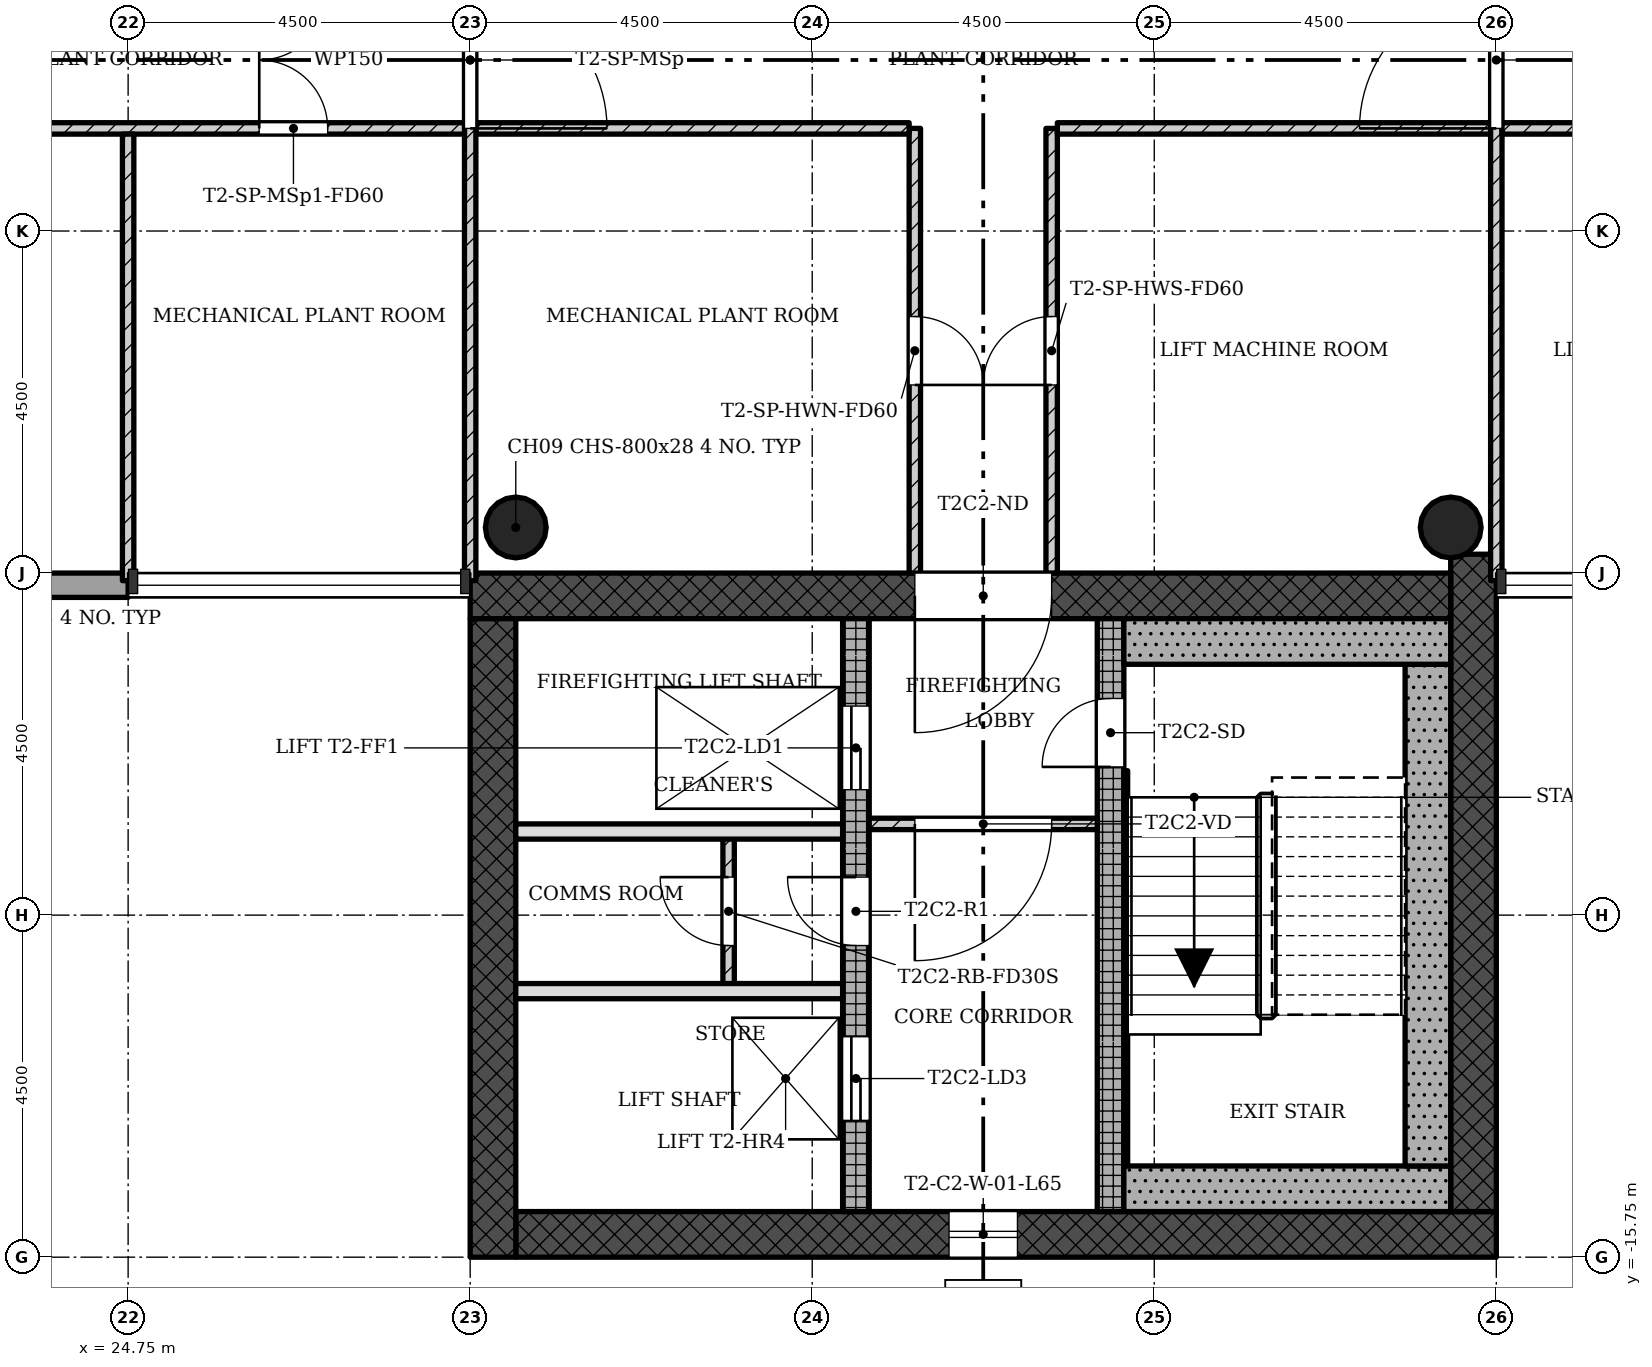
"""IFC4 building model, lengths in metres.
Left out: names, types, materials, properties, quantities, classifications, styles, units other than length and angle.
Written with IfcOpenShell. Run it as: python <this file> out.ifc"""

import sys

from ifc_helpers import new_model, si_unit, direction, frame, frame_2d, origin, origin_2d, place, context, subcontext, project, spatial, rectangle, hollow_circle, extrude, element, fill, save


model = new_model("IFC4")
c1 = context("Model", 3, precision=1e-05, world=origin(), true_north=direction((0.0, 1.0)))
c2 = subcontext(c1, "Body", "Model", "MODEL_VIEW")
j1 = project(units=[si_unit("LENGTHUNIT", "METRE"), si_unit("PLANEANGLEUNIT", "RADIAN")], contexts=[c1])
p1 = place(None, origin())
s1 = spatial("IfcSite", under=j1, at=p1, CompositionType="ELEMENT")
p2 = place(p1, origin())
s2 = spatial("IfcBuilding", under=s1, at=p2, CompositionType="ELEMENT")
p3 = place(p2, frame((0.0, 0.0, 233.4)))
s3 = spatial("IfcBuildingStorey", under=s2, at=p3, CompositionType="ELEMENT", Elevation=233.4)
p4 = place(p3, frame((29.85, -15.45, 0.0), z_axis=(0.0, 0.0, 1.0), x_axis=(1.0, 0.0, 0.0)))
e1 = element("IfcWall", 1, at=p4, inside=s3, PredefinedType="SHEAR", context=c2, shape_type="SweptSolid", body=[
    extrude(rectangle(XDim=12.9, YDim=0.6, at=frame_2d((6.45, 0.0))), origin(), (0.0, 0.0, 1.0), 4.5),
])
p5 = place(p4, frame((5.7, 0.0, 0.45)))
e2 = element("IfcOpeningElement", 2, at=p5, cuts=e1, PredefinedType="OPENING", context=c2, shape_type="SweptSolid", body=[
    extrude(rectangle(XDim=0.9, YDim=2.4, at=frame_2d((0.45, 1.2))), frame((0.0, 0.31, 0.0), z_axis=(0.0, -1.0, 0.0), x_axis=(1.0, 0.0, 0.0)), (0.0, 0.0, 1.0), 0.62),
])
p6 = place(p3, frame((42.45, -15.15, 0.0), z_axis=(0.0, 0.0, 1.0), x_axis=(0.0, 1.0, 0.0)))
e3 = element("IfcWall", 3, at=p6, inside=s3, PredefinedType="SHEAR", context=c2, shape_type="SweptSolid", body=[
    extrude(rectangle(XDim=8.648, YDim=0.6, at=frame_2d((4.324, 0.0))), origin(), (0.0, 0.0, 1.0), 4.5),
])
p7 = place(p3, frame((42.15, -7.05, 0.0), z_axis=(0.0, 0.0, 1.0), x_axis=(-1.0, 0.0, 0.0)))
e4 = element("IfcWall", 4, at=p7, inside=s3, PredefinedType="SHEAR", context=c2, shape_type="SweptSolid", body=[
    extrude(rectangle(XDim=12.9, YDim=0.6, at=frame_2d((6.45, 0.0))), origin(), (0.0, 0.0, 1.0), 4.5),
])
p8 = place(p7, frame((5.25, 0.0, 0.0)))
e5 = element("IfcOpeningElement", 5, at=p8, cuts=e4, PredefinedType="OPENING", context=c2, shape_type="SweptSolid", body=[
    extrude(rectangle(XDim=1.8, YDim=2.1, at=frame_2d((0.9, 1.05))), frame((0.0, 0.31, 0.0), z_axis=(0.0, -1.0, 0.0), x_axis=(1.0, 0.0, 0.0)), (0.0, 0.0, 1.0), 0.62),
])
p9 = place(p3, frame((29.55, -7.35, 0.0), z_axis=(0.0, 0.0, 1.0), x_axis=(0.0, -1.0, 0.0)))
e6 = element("IfcWall", 6, at=p9, inside=s3, PredefinedType="SHEAR", context=c2, shape_type="SweptSolid", body=[
    extrude(rectangle(XDim=8.4, YDim=0.6, at=frame_2d((4.2, 0.0))), origin(), (0.0, 0.0, 1.0), 4.5),
])
p10 = place(p3, frame((34.325, -15.15, 0.0), z_axis=(0.0, 0.0, 1.0), x_axis=(0.0, 1.0, 0.0)))
e7 = element("IfcWall", 7, at=p10, inside=s3, PredefinedType="SHEAR", context=c2, shape_type="SweptSolid", body=[
    extrude(rectangle(XDim=7.8, YDim=0.35, at=frame_2d((3.9, 0.0))), origin(), (0.0, 0.0, 1.0), 4.5),
])
p11 = place(p10, frame((5.55, 0.0, 0.0)))
e8 = element("IfcOpeningElement", 8, at=p11, cuts=e7, PredefinedType="OPENING", context=c2, shape_type="SweptSolid", body=[
    extrude(rectangle(XDim=1.1, YDim=2.1, at=frame_2d((0.55, 1.05))), frame((0.0, 0.185, 0.0), z_axis=(0.0, -1.0, 0.0), x_axis=(1.0, 0.0, 0.0)), (0.0, 0.0, 1.0), 0.37),
])
p12 = place(p10, frame((1.2, 0.0, 0.0)))
e9 = element("IfcOpeningElement", 9, at=p12, cuts=e7, PredefinedType="OPENING", context=c2, shape_type="SweptSolid", body=[
    extrude(rectangle(XDim=1.1, YDim=2.1, at=frame_2d((0.55, 1.05))), frame((0.0, 0.185, 0.0), z_axis=(0.0, -1.0, 0.0), x_axis=(1.0, 0.0, 0.0)), (0.0, 0.0, 1.0), 0.37),
])
p13 = place(p10, frame((3.5, 0.0, 0.0)))
e10 = element("IfcOpeningElement", 10, at=p13, cuts=e7, PredefinedType="OPENING", context=c2, shape_type="SweptSolid", body=[
    extrude(rectangle(XDim=0.9, YDim=2.1, at=frame_2d((0.45, 1.05))), frame((0.0, 0.185, 0.0), z_axis=(0.0, -1.0, 0.0), x_axis=(1.0, 0.0, 0.0)), (0.0, 0.0, 1.0), 0.37),
])
p14 = place(p3, frame((37.675, -15.15, 0.0), z_axis=(0.0, 0.0, 1.0), x_axis=(0.0, 1.0, 0.0)))
e11 = element("IfcWall", 11, at=p14, inside=s3, PredefinedType="SHEAR", context=c2, shape_type="SweptSolid", body=[
    extrude(rectangle(XDim=7.8, YDim=0.35, at=frame_2d((3.9, 0.0))), origin(), (0.0, 0.0, 1.0), 4.5),
])
p15 = place(p14, frame((5.85, 0.0, 0.0)))
e12 = element("IfcOpeningElement", 12, at=p15, cuts=e11, PredefinedType="OPENING", context=c2, shape_type="SweptSolid", body=[
    extrude(rectangle(XDim=0.9, YDim=2.1, at=frame_2d((0.45, 1.05))), frame((0.0, 0.185, 0.0), z_axis=(0.0, -1.0, 0.0), x_axis=(1.0, 0.0, 0.0)), (0.0, 0.0, 1.0), 0.37),
])
for number, where, z_axis, x_axis in (
    (13, (42.15, -6.15, 0.0), (0.0, 0.0, 1.0), (1.0, 0.0, 0.0)),
    (14, (29.85, -6.15, 0.0), (0.0, 0.0, 1.0), (1.0, 0.0, 0.0)),
):
    element("IfcColumn", number, at=place(p3, frame(where, z_axis=z_axis, x_axis=x_axis)), inside=s3, PredefinedType="COLUMN", context=c2, shape_type="SweptSolid", body=[
        extrude(hollow_circle(Radius=0.4, WallThickness=0.028, at=origin_2d()), origin(), (0.0, 0.0, 1.0), 4.5),
    ])
p16 = place(p3, frame((23.25, -6.91, 0.0), z_axis=(0.0, 0.0, 1.0), x_axis=(1.0, 0.0, 0.0)))
e15 = element("IfcWall", 15, at=p16, inside=s3, PredefinedType="STANDARD", context=c2, shape_type="SweptSolid", body=[
    extrude(rectangle(XDim=1.5, YDim=0.32, at=frame_2d((0.75, 0.0))), origin(), (0.0, 0.0, 1.0), 4.2),
])
p17 = place(p3, frame((34.5, -10.05, 0.0), z_axis=(0.0, 0.0, 1.0), x_axis=(1.0, 0.0, 0.0)))
e16 = element("IfcWall", 16, at=p17, inside=s3, PredefinedType="PARTITIONING", context=c2, shape_type="SweptSolid", body=[
    extrude(rectangle(XDim=3.0, YDim=0.15, at=frame_2d((1.5, 0.0))), origin(), (0.0, 0.0, 1.0), 4.1),
])
p18 = place(p17, frame((0.6, 0.0, 0.0)))
e17 = element("IfcOpeningElement", 17, at=p18, cuts=e16, PredefinedType="OPENING", context=c2, shape_type="SweptSolid", body=[
    extrude(rectangle(XDim=1.8, YDim=2.1, at=frame_2d((0.9, 1.05))), frame((0.0, 0.085, 0.0), z_axis=(0.0, -1.0, 0.0), x_axis=(1.0, 0.0, 0.0)), (0.0, 0.0, 1.0), 0.17),
])
for number, where, z_axis, x_axis in (
    (18, (29.85, -12.25, 0.0), (0.0, 0.0, 1.0), (1.0, 0.0, 0.0)),
    (19, (29.85, -10.15, 0.0), (0.0, 0.0, 1.0), (1.0, 0.0, 0.0)),
):
    element("IfcWall", number, at=place(p3, frame(where, z_axis=z_axis, x_axis=x_axis)), inside=s3, PredefinedType="SOLIDWALL", context=c2, shape_type="SweptSolid", body=[
        extrude(rectangle(XDim=4.3, YDim=0.2, at=frame_2d((2.15, 0.0))), origin(), (0.0, 0.0, 1.0), 4.1),
    ])
p19 = place(p3, frame((32.65, -10.15, 0.0), z_axis=(0.0, 0.0, 1.0), x_axis=(0.0, -1.0, 0.0)))
e20 = element("IfcWall", 20, at=p19, inside=s3, PredefinedType="PARTITIONING", context=c2, shape_type="SweptSolid", body=[
    extrude(rectangle(XDim=2.1, YDim=0.15, at=frame_2d((1.05, 0.0))), origin(), (0.0, 0.0, 1.0), 4.1),
])
p20 = place(p19, frame((0.6, 0.0, 0.0)))
e21 = element("IfcOpeningElement", 21, at=p20, cuts=e20, PredefinedType="OPENING", context=c2, shape_type="SweptSolid", body=[
    extrude(rectangle(XDim=0.9, YDim=2.1, at=frame_2d((0.45, 1.05))), frame((0.0, 0.085, 0.0), z_axis=(0.0, -1.0, 0.0), x_axis=(1.0, 0.0, 0.0)), (0.0, 0.0, 1.0), 0.17),
])
p21 = place(p3, frame((35.1, -6.75, 0.0), z_axis=(0.0, 0.0, 1.0), x_axis=(0.0, 1.0, 0.0)))
e22 = element("IfcWall", 22, at=p21, inside=s3, PredefinedType="PARTITIONING", context=c2, shape_type="SweptSolid", body=[
    extrude(rectangle(XDim=5.85, YDim=0.15, at=frame_2d((2.925, 0.0))), origin(), (0.0, 0.0, 1.0), 4.1),
])
p22 = place(p21, frame((2.475, 0.0, 0.0)))
e23 = element("IfcOpeningElement", 23, at=p22, cuts=e22, PredefinedType="OPENING", context=c2, shape_type="SweptSolid", body=[
    extrude(rectangle(XDim=0.9, YDim=2.1, at=frame_2d((0.45, 1.05))), frame((0.0, 0.085, 0.0), z_axis=(0.0, -1.0, 0.0), x_axis=(1.0, 0.0, 0.0)), (0.0, 0.0, 1.0), 0.17),
])
p23 = place(p3, frame((35.025, -0.9, 0.0), z_axis=(0.0, 0.0, 1.0), x_axis=(-1.0, 0.0, 0.0)))
e24 = element("IfcWall", 24, at=p23, inside=s3, PredefinedType="PARTITIONING", context=c2, shape_type="SweptSolid", body=[
    extrude(rectangle(XDim=5.7, YDim=0.15, at=frame_2d((2.85, 0.0))), origin(), (0.0, 0.0, 1.0), 4.1),
])
p24 = place(p3, frame((36.9, -6.75, 0.0), z_axis=(0.0, 0.0, 1.0), x_axis=(0.0, 1.0, 0.0)))
e25 = element("IfcWall", 25, at=p24, inside=s3, PredefinedType="PARTITIONING", context=c2, shape_type="SweptSolid", body=[
    extrude(rectangle(XDim=5.85, YDim=0.15, at=frame_2d((2.925, 0.0))), origin(), (0.0, 0.0, 1.0), 4.1),
])
p25 = place(p24, frame((2.475, 0.0, 0.0)))
e26 = element("IfcOpeningElement", 26, at=p25, cuts=e25, PredefinedType="OPENING", context=c2, shape_type="SweptSolid", body=[
    extrude(rectangle(XDim=0.9, YDim=2.1, at=frame_2d((0.45, 1.05))), frame((0.0, 0.085, 0.0), z_axis=(0.0, -1.0, 0.0), x_axis=(1.0, 0.0, 0.0)), (0.0, 0.0, 1.0), 0.17),
])
p26 = place(p3, frame((42.675, -0.9, 0.0), z_axis=(0.0, 0.0, 1.0), x_axis=(-1.0, 0.0, 0.0)))
e27 = element("IfcWall", 27, at=p26, inside=s3, PredefinedType="PARTITIONING", context=c2, shape_type="SweptSolid", body=[
    extrude(rectangle(XDim=5.7, YDim=0.15, at=frame_2d((2.85, 0.0))), origin(), (0.0, 0.0, 1.0), 4.1),
])
p27 = place(p3, frame((29.25, -6.85, 0.0), z_axis=(0.0, 0.0, 1.0), x_axis=(0.0, 1.0, 0.0)))
e28 = element("IfcWall", 28, at=p27, inside=s3, PredefinedType="PARTITIONING", context=c2, shape_type="SweptSolid", body=[
    extrude(rectangle(XDim=13.7, YDim=0.15, at=frame_2d((6.85, 0.0))), origin(), (0.0, 0.0, 1.0), 4.1),
])
p28 = place(p27, frame((5.95, 0.0, 0.0)))
e29 = element("IfcOpeningElement", 29, at=p28, cuts=e28, PredefinedType="OPENING", context=c2, shape_type="SweptSolid", body=[
    extrude(rectangle(XDim=1.8, YDim=2.1, at=frame_2d((0.9, 1.05))), frame((0.0, 0.085, 0.0), z_axis=(0.0, -1.0, 0.0), x_axis=(1.0, 0.0, 0.0)), (0.0, 0.0, 1.0), 0.17),
])
p29 = place(p3, frame((29.175, -0.9, 0.0), z_axis=(0.0, 0.0, 1.0), x_axis=(-1.0, 0.0, 0.0)))
e30 = element("IfcWall", 30, at=p29, inside=s3, PredefinedType="PARTITIONING", context=c2, shape_type="SweptSolid", body=[
    extrude(rectangle(XDim=9.025, YDim=0.15, at=frame_2d((4.513, 0.0))), origin(), (0.0, 0.0, 1.0), 4.1),
])
p30 = place(p29, frame((1.8, 0.0, 0.0)))
e31 = element("IfcOpeningElement", 31, at=p30, cuts=e30, PredefinedType="OPENING", context=c2, shape_type="SweptSolid", body=[
    extrude(rectangle(XDim=0.9, YDim=2.1, at=frame_2d((0.45, 1.05))), frame((0.0, 0.085, 0.0), z_axis=(0.0, -1.0, 0.0), x_axis=(1.0, 0.0, 0.0)), (0.0, 0.0, 1.0), 0.17),
])
p31 = place(p29, frame((6.3, 0.0, 0.0)))
e32 = element("IfcOpeningElement", 32, at=p31, cuts=e30, PredefinedType="OPENING", context=c2, shape_type="SweptSolid", body=[
    extrude(rectangle(XDim=0.9, YDim=2.1, at=frame_2d((0.45, 1.05))), frame((0.0, 0.085, 0.0), z_axis=(0.0, -1.0, 0.0), x_axis=(1.0, 0.0, 0.0)), (0.0, 0.0, 1.0), 0.17),
])
p32 = place(p3, frame((24.75, -0.975, 0.0), z_axis=(0.0, 0.0, 1.0), x_axis=(0.0, -1.0, 0.0)))
e33 = element("IfcWall", 33, at=p32, inside=s3, PredefinedType="PARTITIONING", context=c2, shape_type="SweptSolid", body=[
    extrude(rectangle(XDim=5.875, YDim=0.15, at=frame_2d((2.938, 0.0))), origin(), (0.0, 0.0, 1.0), 4.1),
])
p33 = place(p3, frame((42.75, -6.85, 0.0), z_axis=(0.0, 0.0, 1.0), x_axis=(0.0, 1.0, 0.0)))
e34 = element("IfcWall", 34, at=p33, inside=s3, PredefinedType="PARTITIONING", context=c2, shape_type="SweptSolid", body=[
    extrude(rectangle(XDim=13.7, YDim=0.15, at=frame_2d((6.85, 0.0))), origin(), (0.0, 0.0, 1.0), 4.1),
])
p34 = place(p33, frame((5.95, 0.0, 0.0)))
e35 = element("IfcOpeningElement", 35, at=p34, cuts=e34, PredefinedType="OPENING", context=c2, shape_type="SweptSolid", body=[
    extrude(rectangle(XDim=1.8, YDim=2.1, at=frame_2d((0.9, 1.05))), frame((0.0, 0.085, 0.0), z_axis=(0.0, -1.0, 0.0), x_axis=(1.0, 0.0, 0.0)), (0.0, 0.0, 1.0), 0.17),
])
p35 = place(p3, frame((51.85, -0.9, 0.0), z_axis=(0.0, 0.0, 1.0), x_axis=(-1.0, 0.0, 0.0)))
e36 = element("IfcWall", 36, at=p35, inside=s3, PredefinedType="PARTITIONING", context=c2, shape_type="SweptSolid", body=[
    extrude(rectangle(XDim=9.025, YDim=0.15, at=frame_2d((4.513, 0.0))), origin(), (0.0, 0.0, 1.0), 4.1),
])
p36 = place(p35, frame((1.9, 0.0, 0.0)))
e37 = element("IfcOpeningElement", 37, at=p36, cuts=e36, PredefinedType="OPENING", context=c2, shape_type="SweptSolid", body=[
    extrude(rectangle(XDim=0.9, YDim=2.1, at=frame_2d((0.45, 1.05))), frame((0.0, 0.085, 0.0), z_axis=(0.0, -1.0, 0.0), x_axis=(1.0, 0.0, 0.0)), (0.0, 0.0, 1.0), 0.17),
])
p37 = place(p35, frame((6.4, 0.0, 0.0)))
e38 = element("IfcOpeningElement", 38, at=p37, cuts=e36, PredefinedType="OPENING", context=c2, shape_type="SweptSolid", body=[
    extrude(rectangle(XDim=0.9, YDim=2.1, at=frame_2d((0.45, 1.05))), frame((0.0, 0.085, 0.0), z_axis=(0.0, -1.0, 0.0), x_axis=(1.0, 0.0, 0.0)), (0.0, 0.0, 1.0), 0.17),
])
p38 = place(p3, frame((37.85, -14.85, 0.0), z_axis=(0.0, 0.0, 1.0), x_axis=(1.0, 0.0, 0.0)))
e39 = element("IfcWall", 39, at=p38, inside=s3, PredefinedType="SHEAR", context=c2, shape_type="SweptSolid", body=[
    extrude(rectangle(XDim=4.3, YDim=0.6, at=frame_2d((2.15, 0.0))), origin(), (0.0, 0.0, 1.0), 4.5),
])
p39 = place(p3, frame((41.85, -7.95, 0.0), z_axis=(0.0, 0.0, 1.0), x_axis=(0.0, -1.0, 0.0)))
e40 = element("IfcWall", 40, at=p39, inside=s3, PredefinedType="SHEAR", context=c2, shape_type="SweptSolid", body=[
    extrude(rectangle(XDim=6.6, YDim=0.6, at=frame_2d((3.3, 0.0))), origin(), (0.0, 0.0, 1.0), 4.5),
])
p40 = place(p3, frame((37.85, -7.65, 0.0), z_axis=(0.0, 0.0, 1.0), x_axis=(1.0, 0.0, 0.0)))
e41 = element("IfcWall", 41, at=p40, inside=s3, PredefinedType="SHEAR", context=c2, shape_type="SweptSolid", body=[
    extrude(rectangle(XDim=4.3, YDim=0.6, at=frame_2d((2.15, 0.0))), origin(), (0.0, 0.0, 1.0), 4.5),
])
p41 = place(p3, frame((37.875, -9.35, 0.0), z_axis=(0.0, 0.0, 1.0), x_axis=(0.0, -1.0, 0.0)))
e42 = element("IfcWall", 42, at=p41, inside=s3, PredefinedType="SHEAR", context=c2, shape_type="SweptSolid", body=[
    extrude(rectangle(XDim=5.2, YDim=0.05, at=frame_2d((2.6, 0.0))), origin(), (0.0, 0.0, 1.0), 4.5),
])
p42 = place(p5, origin())
e43 = element("IfcWindow", 43, at=p42, inside=s3, PartitioningType="SINGLE_PANEL", PredefinedType="WINDOW", context=c2, shape_type="SweptSolid", body=[
    extrude(rectangle(XDim=0.9, YDim=2.4, at=frame_2d((0.45, 1.2))), frame((0.0, 0.03, 0.0), z_axis=(0.0, -1.0, 0.0), x_axis=(1.0, 0.0, 0.0)), (0.0, 0.0, 1.0), 0.06),
])
fill(e2, e43)
p43 = place(p18, origin())
e44 = element("IfcDoor", 44, at=p43, inside=s3, OperationType="SINGLE_SWING_LEFT", PredefinedType="DOOR", context=c2, shape_type="SweptSolid", body=[
    extrude(rectangle(XDim=1.8, YDim=2.1, at=frame_2d((0.9, 1.05))), frame((0.0, 0.025, 0.0), z_axis=(0.0, -1.0, 0.0), x_axis=(1.0, 0.0, 0.0)), (0.0, 0.0, 1.0), 0.05),
])
fill(e17, e44)
p44 = place(p20, origin())
e45 = element("IfcDoor", 45, at=p44, inside=s3, OperationType="SINGLE_SWING_LEFT", PredefinedType="DOOR", context=c2, shape_type="SweptSolid", body=[
    extrude(rectangle(XDim=0.9, YDim=2.1, at=frame_2d((0.45, 1.05))), frame((0.0, 0.025, 0.0), z_axis=(0.0, -1.0, 0.0), x_axis=(1.0, 0.0, 0.0)), (0.0, 0.0, 1.0), 0.05),
])
fill(e21, e45)
p45 = place(p22, origin())
e46 = element("IfcDoor", 46, at=p45, inside=s3, OperationType="SINGLE_SWING_LEFT", PredefinedType="DOOR", context=c2, shape_type="SweptSolid", body=[
    extrude(rectangle(XDim=0.9, YDim=2.1, at=frame_2d((0.45, 1.05))), frame((0.0, 0.025, 0.0), z_axis=(0.0, -1.0, 0.0), x_axis=(1.0, 0.0, 0.0)), (0.0, 0.0, 1.0), 0.05),
])
fill(e23, e46)
p46 = place(p25, origin())
e47 = element("IfcDoor", 47, at=p46, inside=s3, OperationType="SINGLE_SWING_RIGHT", PredefinedType="DOOR", context=c2, shape_type="SweptSolid", body=[
    extrude(rectangle(XDim=0.9, YDim=2.1, at=frame_2d((0.45, 1.05))), frame((0.0, 0.025, 0.0), z_axis=(0.0, -1.0, 0.0), x_axis=(1.0, 0.0, 0.0)), (0.0, 0.0, 1.0), 0.05),
])
fill(e26, e47)
p47 = place(p28, origin())
e48 = element("IfcDoor", 48, at=p47, inside=s3, OperationType="SINGLE_SWING_LEFT", PredefinedType="DOOR", context=c2, shape_type="SweptSolid", body=[
    extrude(rectangle(XDim=1.8, YDim=2.1, at=frame_2d((0.9, 1.05))), frame((0.0, 0.025, 0.0), z_axis=(0.0, -1.0, 0.0), x_axis=(1.0, 0.0, 0.0)), (0.0, 0.0, 1.0), 0.05),
])
fill(e29, e48)
p48 = place(p30, origin())
e49 = element("IfcDoor", 49, at=p48, inside=s3, OperationType="SINGLE_SWING_RIGHT", PredefinedType="DOOR", context=c2, shape_type="SweptSolid", body=[
    extrude(rectangle(XDim=0.9, YDim=2.1, at=frame_2d((0.45, 1.05))), frame((0.0, 0.025, 0.0), z_axis=(0.0, -1.0, 0.0), x_axis=(1.0, 0.0, 0.0)), (0.0, 0.0, 1.0), 0.05),
])
fill(e31, e49)
p49 = place(p34, origin())
e50 = element("IfcDoor", 50, at=p49, inside=s3, OperationType="SINGLE_SWING_RIGHT", PredefinedType="DOOR", context=c2, shape_type="SweptSolid", body=[
    extrude(rectangle(XDim=1.8, YDim=2.1, at=frame_2d((0.9, 1.05))), frame((0.0, 0.025, 0.0), z_axis=(0.0, -1.0, 0.0), x_axis=(1.0, 0.0, 0.0)), (0.0, 0.0, 1.0), 0.05),
])
fill(e35, e50)
p50 = place(p15, origin())
e51 = element("IfcDoor", 51, at=p50, inside=s3, OperationType="SINGLE_SWING_RIGHT", PredefinedType="DOOR", context=c2, shape_type="SweptSolid", body=[
    extrude(rectangle(XDim=0.9, YDim=2.1, at=frame_2d((0.45, 1.05))), frame((0.0, 0.025, 0.0), z_axis=(0.0, -1.0, 0.0), x_axis=(1.0, 0.0, 0.0)), (0.0, 0.0, 1.0), 0.05),
])
fill(e12, e51)
p51 = place(p11, origin())
e52 = element("IfcDoor", 52, at=p51, inside=s3, OperationType="SLIDING_TO_LEFT", PredefinedType="DOOR", context=c2, shape_type="SweptSolid", body=[
    extrude(rectangle(XDim=1.1, YDim=2.1, at=frame_2d((0.55, 1.05))), frame((0.0, 0.025, 0.0), z_axis=(0.0, -1.0, 0.0), x_axis=(1.0, 0.0, 0.0)), (0.0, 0.0, 1.0), 0.05),
])
fill(e8, e52)
p52 = place(p12, origin())
e53 = element("IfcDoor", 53, at=p52, inside=s3, OperationType="SLIDING_TO_LEFT", PredefinedType="DOOR", context=c2, shape_type="SweptSolid", body=[
    extrude(rectangle(XDim=1.1, YDim=2.1, at=frame_2d((0.55, 1.05))), frame((0.0, 0.025, 0.0), z_axis=(0.0, -1.0, 0.0), x_axis=(1.0, 0.0, 0.0)), (0.0, 0.0, 1.0), 0.05),
])
fill(e9, e53)
p53 = place(p13, origin())
e54 = element("IfcDoor", 54, at=p53, inside=s3, OperationType="SINGLE_SWING_LEFT", PredefinedType="DOOR", context=c2, shape_type="SweptSolid", body=[
    extrude(rectangle(XDim=0.9, YDim=2.1, at=frame_2d((0.45, 1.05))), frame((0.0, 0.025, 0.0), z_axis=(0.0, -1.0, 0.0), x_axis=(1.0, 0.0, 0.0)), (0.0, 0.0, 1.0), 0.05),
])
fill(e10, e54)
p54 = place(p8, origin())
e55 = element("IfcDoor", 55, at=p54, inside=s3, OperationType="SINGLE_SWING_LEFT", PredefinedType="DOOR", context=c2, shape_type="SweptSolid", body=[
    extrude(rectangle(XDim=1.8, YDim=2.1, at=frame_2d((0.9, 1.05))), frame((0.0, 0.025, 0.0), z_axis=(0.0, -1.0, 0.0), x_axis=(1.0, 0.0, 0.0)), (0.0, 0.0, 1.0), 0.05),
])
fill(e5, e55)
save(model, sys.argv[1])
